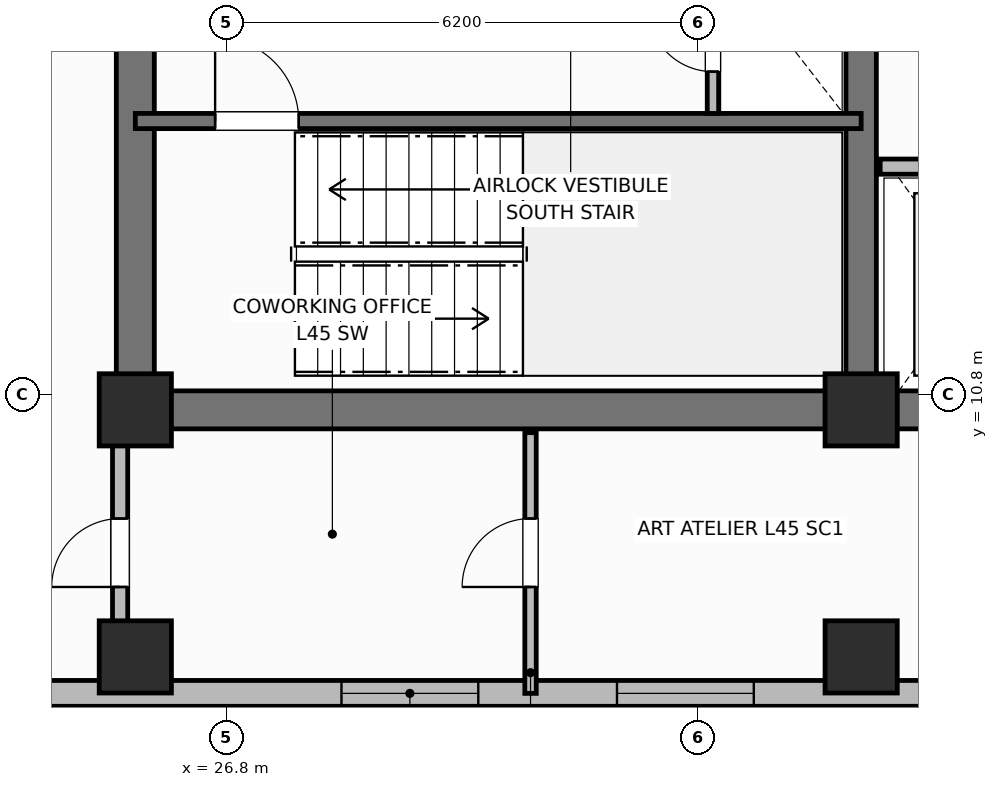
"""IFC4 building model, lengths in metres.
Left out: names, types, materials, properties, quantities, classifications, styles, units other than length and angle.
Written with IfcOpenShell. Run it as: python <this file> out.ifc"""

import sys

from ifc_helpers import new_model, si_unit, direction, frame, frame_2d, origin, origin_2d, place, context, subcontext, project, spatial, rectangle, extrude, element, fill, save


model = new_model("IFC4")
c1 = context("Model", 3, precision=1e-05, world=origin(), true_north=direction((0.0, 1.0)))
c2 = subcontext(c1, "Body", "Model", "MODEL_VIEW")
j1 = project(units=[si_unit("LENGTHUNIT", "METRE"), si_unit("PLANEANGLEUNIT", "RADIAN")], contexts=[c1])
p1 = place(None, origin())
s1 = spatial("IfcSite", under=j1, at=p1, CompositionType="ELEMENT")
p2 = place(p1, origin())
s2 = spatial("IfcBuilding", under=s1, at=p2, CompositionType="ELEMENT")
p3 = place(p2, frame((0.0, 0.0, 181.1)))
s3 = spatial("IfcBuildingStorey", under=s2, at=p3, CompositionType="ELEMENT", Elevation=181.1)
p4 = place(p3, frame((52.8, 10.6, 0.0), z_axis=(0.0, 0.0, 1.0), x_axis=(-1.0, 0.0, 0.0)))
e1 = element("IfcWall", 1, at=p4, inside=s3, PredefinedType="SHEAR", context=c2, shape_type="SweptSolid", body=[
    extrude(rectangle(XDim=27.2, YDim=0.5, at=frame_2d((13.6, 0.0))), origin(), (0.0, 0.0, 1.0), 3.7),
])
p5 = place(p3, frame((25.6, 10.85, 0.0), z_axis=(0.0, 0.0, 1.0), x_axis=(0.0, 1.0, 0.0)))
e2 = element("IfcWall", 2, at=p5, inside=s3, PredefinedType="SHEAR", context=c2, shape_type="SweptSolid", body=[
    extrude(rectangle(XDim=5.7, YDim=0.5, at=frame_2d((2.85, 0.0))), origin(), (0.0, 0.0, 1.0), 3.7),
])
p6 = place(p3, frame((35.15, 10.85, 0.0), z_axis=(0.0, 0.0, 1.0), x_axis=(0.0, 1.0, 0.0)))
e3 = element("IfcWall", 3, at=p6, inside=s3, PredefinedType="SHEAR", context=c2, shape_type="SweptSolid", body=[
    extrude(rectangle(XDim=5.7, YDim=0.4, at=frame_2d((2.85, 0.0))), origin(), (0.0, 0.0, 1.0), 3.7),
])
for number, where, z_axis, x_axis in (
    (4, (25.6, 10.6, 0.0), (0.0, 0.0, 1.0), (1.0, 0.0, 0.0)),
    (5, (35.15, 10.6, 0.0), (0.0, 0.0, 1.0), (1.0, 0.0, 0.0)),
    (6, (25.6, 7.35, 0.0), (0.0, 0.0, 1.0), (1.0, 0.0, 0.0)),
    (7, (35.15, 7.35, 0.0), (0.0, 0.0, 1.0), (1.0, 0.0, 0.0)),
):
    element("IfcColumn", number, at=place(p3, frame(where, z_axis=z_axis, x_axis=x_axis)), inside=s3, PredefinedType="COLUMN", context=c2, shape_type="SweptSolid", body=[
        extrude(rectangle(XDim=0.95, YDim=0.95, at=origin_2d()), origin(), (0.0, 0.0, 1.0), 3.7),
    ])
p7 = place(p3, frame((20.2, 6.87, 0.0), z_axis=(0.0, 0.0, 1.0), x_axis=(1.0, 0.0, 0.0)))
e8 = element("IfcWall", 8, at=p7, inside=s3, PredefinedType="SOLIDWALL", context=c2, shape_type="SweptSolid", body=[
    extrude(rectangle(XDim=15.8, YDim=0.34, at=frame_2d((7.9, 0.0))), origin(), (0.0, 0.0, 1.0), 2.72),
])
p8 = place(p7, frame((8.113, 0.0, 0.75)))
e9 = element("IfcOpeningElement", 9, at=p8, cuts=e8, PredefinedType="OPENING", context=c2, shape_type="SweptSolid", body=[
    extrude(rectangle(XDim=1.8, YDim=1.85, at=frame_2d((0.9, 0.925))), frame((0.0, 0.18, 0.0), z_axis=(0.0, -1.0, 0.0), x_axis=(1.0, 0.0, 0.0)), (0.0, 0.0, 1.0), 0.36),
])
p9 = place(p7, frame((11.738, 0.0, 0.75)))
e10 = element("IfcOpeningElement", 10, at=p9, cuts=e8, PredefinedType="OPENING", context=c2, shape_type="SweptSolid", body=[
    extrude(rectangle(XDim=1.8, YDim=1.85, at=frame_2d((0.9, 0.925))), frame((0.0, 0.18, 0.0), z_axis=(0.0, -1.0, 0.0), x_axis=(1.0, 0.0, 0.0)), (0.0, 0.0, 1.0), 0.36),
])
p10 = place(p3, frame((25.6, 14.4, 0.0), z_axis=(0.0, 0.0, 1.0), x_axis=(1.0, 0.0, 0.0)))
e11 = element("IfcWall", 11, at=p10, inside=s3, PredefinedType="SHEAR", context=c2, shape_type="SweptSolid", body=[
    extrude(rectangle(XDim=9.55, YDim=0.2, at=frame_2d((4.775, 0.0))), origin(), (0.0, 0.0, 1.0), 3.7),
])
p11 = place(p10, frame((1.05, 0.0, 0.0)))
e12 = element("IfcOpeningElement", 12, at=p11, cuts=e11, PredefinedType="OPENING", context=c2, shape_type="SweptSolid", body=[
    extrude(rectangle(XDim=1.1, YDim=2.15, at=frame_2d((0.55, 1.075))), frame((0.0, 0.11, 0.0), z_axis=(0.0, -1.0, 0.0), x_axis=(1.0, 0.0, 0.0)), (0.0, 0.0, 1.0), 0.22),
])
p12 = place(p3, frame((33.2, 14.5, 0.0), z_axis=(0.0, 0.0, 1.0), x_axis=(0.0, 1.0, 0.0)))
e13 = element("IfcWall", 13, at=p12, inside=s3, PredefinedType="PARTITIONING", context=c2, shape_type="SweptSolid", body=[
    extrude(rectangle(XDim=2.08, YDim=0.15, at=frame_2d((1.04, 0.0))), origin(), (0.0, 0.0, 1.0), 2.55),
])
p13 = place(p12, frame((0.55, 0.0, 0.0)))
e14 = element("IfcOpeningElement", 14, at=p13, cuts=e13, PredefinedType="OPENING", context=c2, shape_type="SweptSolid", body=[
    extrude(rectangle(XDim=0.85, YDim=2.05, at=frame_2d((0.425, 1.025))), frame((0.0, 0.085, 0.0), z_axis=(0.0, -1.0, 0.0), x_axis=(1.0, 0.0, 0.0)), (0.0, 0.0, 1.0), 0.17),
])
p14 = place(p3, frame((35.4, 13.8, 0.0), z_axis=(0.0, 0.0, 1.0), x_axis=(1.0, 0.0, 0.0)))
e15 = element("IfcWall", 15, at=p14, inside=s3, PredefinedType="PARTITIONING", context=c2, shape_type="SweptSolid", body=[
    extrude(rectangle(XDim=7.6, YDim=0.2, at=frame_2d((3.8, 0.0))), origin(), (0.0, 0.0, 1.0), 2.32),
])
p15 = place(p14, frame((0.7, 0.0, 0.0)))
e16 = element("IfcOpeningElement", 16, at=p15, cuts=e15, PredefinedType="OPENING", context=c2, shape_type="SweptSolid", body=[
    extrude(rectangle(XDim=1.1, YDim=2.15, at=frame_2d((0.55, 1.075))), frame((0.0, 0.11, 0.0), z_axis=(0.0, -1.0, 0.0), x_axis=(1.0, 0.0, 0.0)), (0.0, 0.0, 1.0), 0.22),
])
p16 = place(p14, frame((3.35, 0.0, 0.0)))
e17 = element("IfcOpeningElement", 17, at=p16, cuts=e15, PredefinedType="OPENING", context=c2, shape_type="SweptSolid", body=[
    extrude(rectangle(XDim=1.2, YDim=2.15, at=frame_2d((0.6, 1.075))), frame((0.0, 0.11, 0.0), z_axis=(0.0, -1.0, 0.0), x_axis=(1.0, 0.0, 0.0)), (0.0, 0.0, 1.0), 0.22),
])
p17 = place(p3, frame((30.8, 6.87, 0.0), z_axis=(0.0, 0.0, 1.0), x_axis=(0.0, 1.0, 0.0)))
e18 = element("IfcWall", 18, at=p17, inside=s3, PredefinedType="PARTITIONING", context=c2, shape_type="SweptSolid", body=[
    extrude(rectangle(XDim=3.43, YDim=0.15, at=frame_2d((1.715, 0.0))), origin(), (0.0, 0.0, 1.0), 2.55),
])
p18 = place(p17, frame((1.4, 0.0, 0.0)))
e19 = element("IfcOpeningElement", 19, at=p18, cuts=e18, PredefinedType="OPENING", context=c2, shape_type="SweptSolid", body=[
    extrude(rectangle(XDim=0.9, YDim=2.1, at=frame_2d((0.45, 1.05))), frame((0.0, 0.085, 0.0), z_axis=(0.0, -1.0, 0.0), x_axis=(1.0, 0.0, 0.0)), (0.0, 0.0, 1.0), 0.17),
])
p19 = place(p3, frame((25.4, 7.62, 0.0), z_axis=(0.0, 0.0, 1.0), x_axis=(0.0, 1.0, 0.0)))
e20 = element("IfcWall", 20, at=p19, inside=s3, PredefinedType="PARTITIONING", context=c2, shape_type="SweptSolid", body=[
    extrude(rectangle(XDim=2.68, YDim=0.2, at=frame_2d((1.34, 0.0))), origin(), (0.0, 0.0, 1.0), 2.55),
])
p20 = place(p19, frame((0.65, 0.0, 0.0)))
e21 = element("IfcOpeningElement", 21, at=p20, cuts=e20, PredefinedType="OPENING", context=c2, shape_type="SweptSolid", body=[
    extrude(rectangle(XDim=0.9, YDim=2.1, at=frame_2d((0.45, 1.05))), frame((0.0, 0.11, 0.0), z_axis=(0.0, -1.0, 0.0), x_axis=(1.0, 0.0, 0.0)), (0.0, 0.0, 1.0), 0.22),
])
p21 = place(p8, origin())
e22 = element("IfcWindow", 22, at=p21, inside=s3, PartitioningType="SINGLE_PANEL", PredefinedType="WINDOW", context=c2, shape_type="SweptSolid", body=[
    extrude(rectangle(XDim=1.8, YDim=1.85, at=frame_2d((0.9, 0.925))), frame((0.0, 0.03, 0.0), z_axis=(0.0, -1.0, 0.0), x_axis=(1.0, 0.0, 0.0)), (0.0, 0.0, 1.0), 0.06),
])
fill(e9, e22)
p22 = place(p9, origin())
e23 = element("IfcWindow", 23, at=p22, inside=s3, PartitioningType="SINGLE_PANEL", PredefinedType="WINDOW", context=c2, shape_type="SweptSolid", body=[
    extrude(rectangle(XDim=1.8, YDim=1.85, at=frame_2d((0.9, 0.925))), frame((0.0, 0.03, 0.0), z_axis=(0.0, -1.0, 0.0), x_axis=(1.0, 0.0, 0.0)), (0.0, 0.0, 1.0), 0.06),
])
fill(e10, e23)
p23 = place(p11, origin())
e24 = element("IfcDoor", 24, at=p23, inside=s3, OperationType="SINGLE_SWING_LEFT", PredefinedType="DOOR", context=c2, shape_type="SweptSolid", body=[
    extrude(rectangle(XDim=1.1, YDim=2.15, at=frame_2d((0.55, 1.075))), frame((0.0, 0.025, 0.0), z_axis=(0.0, -1.0, 0.0), x_axis=(1.0, 0.0, 0.0)), (0.0, 0.0, 1.0), 0.05),
])
fill(e12, e24)
p24 = place(p13, origin())
e25 = element("IfcDoor", 25, at=p24, inside=s3, OperationType="SINGLE_SWING_RIGHT", PredefinedType="TRAPDOOR", context=c2, shape_type="SweptSolid", body=[
    extrude(rectangle(XDim=0.85, YDim=2.05, at=frame_2d((0.425, 1.025))), frame((0.0, 0.025, 0.0), z_axis=(0.0, -1.0, 0.0), x_axis=(1.0, 0.0, 0.0)), (0.0, 0.0, 1.0), 0.05),
])
fill(e14, e25)
p25 = place(p18, origin())
e26 = element("IfcDoor", 26, at=p25, inside=s3, OperationType="SINGLE_SWING_LEFT", PredefinedType="DOOR", context=c2, shape_type="SweptSolid", body=[
    extrude(rectangle(XDim=0.9, YDim=2.1, at=frame_2d((0.45, 1.05))), frame((0.0, 0.025, 0.0), z_axis=(0.0, -1.0, 0.0), x_axis=(1.0, 0.0, 0.0)), (0.0, 0.0, 1.0), 0.05),
])
fill(e19, e26)
p26 = place(p20, origin())
e27 = element("IfcDoor", 27, at=p26, inside=s3, OperationType="SINGLE_SWING_LEFT", PredefinedType="DOOR", context=c2, shape_type="SweptSolid", body=[
    extrude(rectangle(XDim=0.9, YDim=2.1, at=frame_2d((0.45, 1.05))), frame((0.0, 0.025, 0.0), z_axis=(0.0, -1.0, 0.0), x_axis=(1.0, 0.0, 0.0)), (0.0, 0.0, 1.0), 0.05),
])
fill(e21, e27)
save(model, sys.argv[1])
